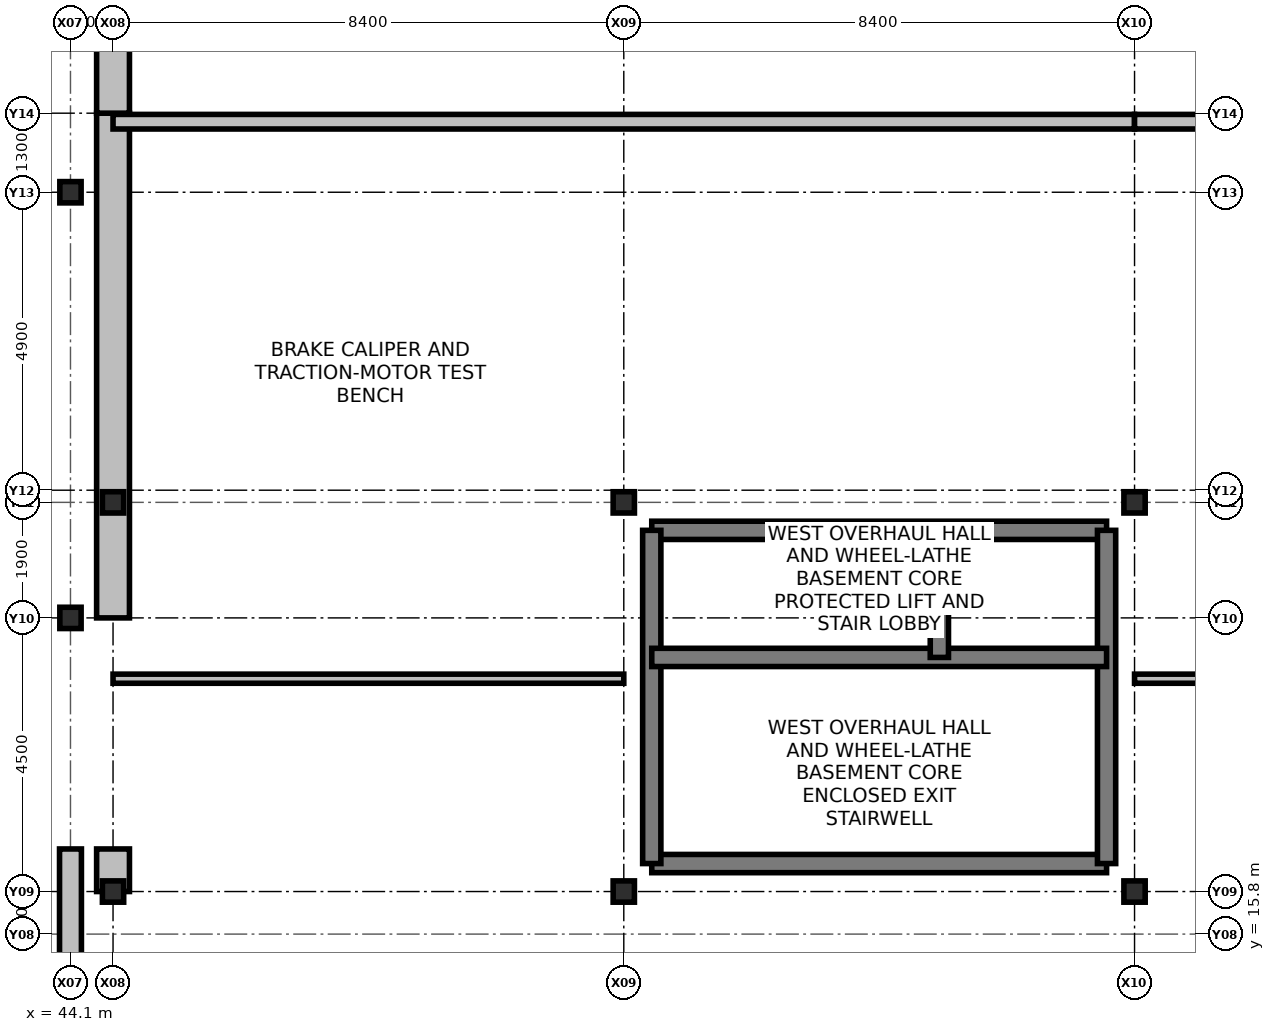
"""IFC4 building model, lengths in metres.
Left out: names, types, materials, properties, quantities, classifications, styles, units other than length and angle.
Written with IfcOpenShell. Run it as: python <this file> out.ifc"""

import sys

from ifc_helpers import new_model, si_unit, direction, frame, frame_2d, origin, origin_2d, place, context, subcontext, project, spatial, rectangle, i_section, extrude, element, fill, save


model = new_model("IFC4")
c1 = context("Model", 3, precision=1e-05, world=origin(), true_north=direction((0.0, 1.0)))
c2 = subcontext(c1, "Body", "Model", "MODEL_VIEW")
j1 = project(units=[si_unit("LENGTHUNIT", "METRE"), si_unit("PLANEANGLEUNIT", "RADIAN")], contexts=[c1])
p1 = place(None, origin())
s1 = spatial("IfcSite", under=j1, at=p1, CompositionType="ELEMENT")
p2 = place(p1, origin())
s2 = spatial("IfcBuilding", under=s1, at=p2, CompositionType="ELEMENT")
p3 = place(p2, frame((0.0, 0.0, 6.0)))
s3 = spatial("IfcBuildingStorey", under=s2, at=p3, CompositionType="ELEMENT", Elevation=6.0)
for number, where, z_axis, x_axis in (
    (1, (44.8, 16.5, 0.0), (0.0, 0.0, 1.0), (1.0, 0.0, 0.0)),
    (2, (44.8, 22.9, 0.0), (0.0, 0.0, 1.0), (1.0, 0.0, 0.0)),
    (3, (53.2, 16.5, 0.0), (0.0, 0.0, 1.0), (1.0, 0.0, 0.0)),
    (4, (53.2, 22.9, 0.0), (0.0, 0.0, 1.0), (1.0, 0.0, 0.0)),
    (5, (61.6, 16.5, 0.0), (0.0, 0.0, 1.0), (1.0, 0.0, 0.0)),
    (6, (61.6, 22.9, 0.0), (0.0, 0.0, 1.0), (1.0, 0.0, 0.0)),
    (7, (44.1, 21.0, 0.0), (0.0, 0.0, 1.0), (1.0, 0.0, 0.0)),
    (8, (44.1, 28.0, 0.0), (0.0, 0.0, 1.0), (1.0, 0.0, 0.0)),
):
    element("IfcColumn", number, at=place(p3, frame(where, z_axis=z_axis, x_axis=x_axis)), inside=s3, PredefinedType="COLUMN", context=c2, shape_type="SweptSolid", body=[
        extrude(i_section(OverallWidth=0.35, OverallDepth=0.35, WebThickness=0.012, FlangeThickness=0.019, at=origin_2d()), origin(), (0.0, 0.0, 1.0), 5.1),
    ])
p4 = place(p3, frame((44.8, 16.5, 0.0), z_axis=(0.0, 0.0, 1.0), x_axis=(0.0, 1.0, 0.0)))
e9 = element("IfcWall", 9, at=p4, inside=s3, PredefinedType="SOLIDWALL", context=c2, shape_type="SweptSolid", body=[
    extrude(rectangle(XDim=0.7, YDim=0.54, at=frame_2d((0.35, 0.0))), origin(), (0.0, 0.0, 1.0), 2.58),
])
p5 = place(p3, frame((44.8, 21.0, 0.0), z_axis=(0.0, 0.0, 1.0), x_axis=(0.0, 1.0, 0.0)))
e10 = element("IfcWall", 10, at=p5, inside=s3, PredefinedType="SOLIDWALL", context=c2, shape_type="SweptSolid", body=[
    extrude(rectangle(XDim=8.3, YDim=0.54, at=frame_2d((4.15, 0.0))), origin(), (0.0, 0.0, 1.0), 2.58),
])
p6 = place(p3, frame((44.8, 29.3, -0.02), z_axis=(0.0, 0.0, 1.0), x_axis=(0.0, 1.0, 0.0)))
e11 = element("IfcWall", 11, at=p6, inside=s3, PredefinedType="SOLIDWALL", context=c2, shape_type="SweptSolid", body=[
    extrude(rectangle(XDim=25.6, YDim=0.54, at=frame_2d((12.8, 0.0))), origin(), (0.0, 0.0, 1.0), 2.6),
])
p7 = place(p3, frame((44.8, 29.16, 9.3), z_axis=(0.0, 0.0, 1.0), x_axis=(1.0, 0.0, 0.0)))
e12 = element("IfcWall", 12, at=p7, inside=s3, PredefinedType="SOLIDWALL", context=c2, shape_type="SweptSolid", body=[
    extrude(rectangle(XDim=16.8, YDim=0.24, at=frame_2d((8.4, 0.0))), origin(), (0.0, 0.0, 1.0), 2.75),
])
p8 = place(p7, frame((2.64, 0.0, 0.45)))
e13 = element("IfcOpeningElement", 13, at=p8, cuts=e12, PredefinedType="OPENING", context=c2, shape_type="SweptSolid", body=[
    extrude(rectangle(XDim=3.0, YDim=1.4, at=frame_2d((1.5, 0.7))), frame((0.0, 0.13, 0.0), z_axis=(0.0, -1.0, 0.0), x_axis=(1.0, 0.0, 0.0)), (0.0, 0.0, 1.0), 0.26),
])
p9 = place(p7, frame((9.94, 0.0, 0.45)))
e14 = element("IfcOpeningElement", 14, at=p9, cuts=e12, PredefinedType="OPENING", context=c2, shape_type="SweptSolid", body=[
    extrude(rectangle(XDim=3.0, YDim=1.4, at=frame_2d((1.5, 0.7))), frame((0.0, 0.13, 0.0), z_axis=(0.0, -1.0, 0.0), x_axis=(1.0, 0.0, 0.0)), (0.0, 0.0, 1.0), 0.26),
])
p10 = place(p3, frame((61.6, 29.16, 9.3), z_axis=(0.0, 0.0, 1.0), x_axis=(1.0, 0.0, 0.0)))
e15 = element("IfcWall", 15, at=p10, inside=s3, PredefinedType="SOLIDWALL", context=c2, shape_type="SweptSolid", body=[
    extrude(rectangle(XDim=16.8, YDim=0.24, at=frame_2d((8.4, 0.0))), origin(), (0.0, 0.0, 1.0), 2.75),
])
p11 = place(p10, frame((2.64, 0.0, 0.45)))
e16 = element("IfcOpeningElement", 16, at=p11, cuts=e15, PredefinedType="OPENING", context=c2, shape_type="SweptSolid", body=[
    extrude(rectangle(XDim=4.2, YDim=1.5, at=frame_2d((2.1, 0.75))), frame((0.0, 0.13, 0.0), z_axis=(0.0, -1.0, 0.0), x_axis=(1.0, 0.0, 0.0)), (0.0, 0.0, 1.0), 0.26),
])
p12 = place(p10, frame((9.94, 0.0, 0.45)))
e17 = element("IfcOpeningElement", 17, at=p12, cuts=e15, PredefinedType="OPENING", context=c2, shape_type="SweptSolid", body=[
    extrude(rectangle(XDim=4.2, YDim=1.5, at=frame_2d((2.1, 0.75))), frame((0.0, 0.13, 0.0), z_axis=(0.0, -1.0, 0.0), x_axis=(1.0, 0.0, 0.0)), (0.0, 0.0, 1.0), 0.26),
])
p13 = place(p3, frame((44.1, 14.0, 0.0), z_axis=(0.0, 0.0, 1.0), x_axis=(0.0, 1.0, 0.0)))
e18 = element("IfcWall", 18, at=p13, inside=s3, PredefinedType="SOLIDWALL", context=c2, shape_type="SweptSolid", body=[
    extrude(rectangle(XDim=3.2, YDim=0.36, at=frame_2d((1.6, 0.0))), origin(), (0.0, 0.0, 1.0), 2.9),
])
p14 = place(p3, frame((53.66, 16.96, 0.0), z_axis=(0.0, 0.0, 1.0), x_axis=(1.0, 0.0, 0.0)))
e19 = element("IfcWall", 19, at=p14, inside=s3, PredefinedType="SHEAR", context=c2, shape_type="SweptSolid", body=[
    extrude(rectangle(XDim=7.48, YDim=0.3, at=frame_2d((3.74, 0.0))), origin(), (0.0, 0.0, 1.0), 4.82),
])
p15 = place(p3, frame((53.66, 22.44, 0.0), z_axis=(0.0, 0.0, 1.0), x_axis=(1.0, 0.0, 0.0)))
e20 = element("IfcWall", 20, at=p15, inside=s3, PredefinedType="SHEAR", context=c2, shape_type="SweptSolid", body=[
    extrude(rectangle(XDim=7.48, YDim=0.3, at=frame_2d((3.74, 0.0))), origin(), (0.0, 0.0, 1.0), 4.82),
])
p16 = place(p15, frame((0.55, 0.0, 0.0)))
e21 = element("IfcOpeningElement", 21, at=p16, cuts=e20, PredefinedType="OPENING", context=c2, shape_type="SweptSolid", body=[
    extrude(rectangle(XDim=1.5, YDim=2.2, at=frame_2d((0.75, 1.1))), frame((0.0, 0.16, 0.0), z_axis=(0.0, -1.0, 0.0), x_axis=(1.0, 0.0, 0.0)), (0.0, 0.0, 1.0), 0.32),
])
for number, where, z_axis, x_axis in (
    (22, (53.66, 16.96, 0.0), (0.0, 0.0, 1.0), (0.0, 1.0, 0.0)),
    (23, (61.14, 16.96, 0.0), (0.0, 0.0, 1.0), (0.0, 1.0, 0.0)),
):
    element("IfcWall", number, at=place(p3, frame(where, z_axis=z_axis, x_axis=x_axis)), inside=s3, PredefinedType="SHEAR", context=c2, shape_type="SweptSolid", body=[
        extrude(rectangle(XDim=5.48, YDim=0.3, at=frame_2d((2.74, 0.0))), origin(), (0.0, 0.0, 1.0), 4.82),
    ])
p17 = place(p3, frame((53.66, 20.35, 0.0), z_axis=(0.0, 0.0, 1.0), x_axis=(1.0, 0.0, 0.0)))
e24 = element("IfcWall", 24, at=p17, inside=s3, PredefinedType="SHEAR", context=c2, shape_type="SweptSolid", body=[
    extrude(rectangle(XDim=7.48, YDim=0.3, at=frame_2d((3.74, 0.0))), origin(), (0.0, 0.0, 1.0), 4.82),
])
p18 = place(p17, frame((0.185, 0.0, 0.0)))
e25 = element("IfcOpeningElement", 25, at=p18, cuts=e24, PredefinedType="OPENING", context=c2, shape_type="SweptSolid", body=[
    extrude(rectangle(XDim=1.05, YDim=2.15, at=frame_2d((0.525, 1.075))), frame((0.0, 0.16, 0.0), z_axis=(0.0, -1.0, 0.0), x_axis=(1.0, 0.0, 0.0)), (0.0, 0.0, 1.0), 0.32),
])
p19 = place(p3, frame((58.39, 20.35, 0.0), z_axis=(0.0, 0.0, 1.0), x_axis=(0.0, 1.0, 0.0)))
e26 = element("IfcWall", 26, at=p19, inside=s3, PredefinedType="SHEAR", context=c2, shape_type="SweptSolid", body=[
    extrude(rectangle(XDim=2.09, YDim=0.3, at=frame_2d((1.045, 0.0))), origin(), (0.0, 0.0, 1.0), 4.82),
])
p20 = place(p19, frame((0.27, 0.0, 0.0)))
e27 = element("IfcOpeningElement", 27, at=p20, cuts=e26, PredefinedType="OPENING", context=c2, shape_type="SweptSolid", body=[
    extrude(rectangle(XDim=1.55, YDim=2.35, at=frame_2d((0.775, 1.175))), frame((0.0, 0.16, 0.0), z_axis=(0.0, -1.0, 0.0), x_axis=(1.0, 0.0, 0.0)), (0.0, 0.0, 1.0), 0.32),
])
p21 = place(p3, frame((44.8, 20.0, 0.0), z_axis=(0.0, 0.0, 1.0), x_axis=(1.0, 0.0, 0.0)))
e28 = element("IfcWall", 28, at=p21, inside=s3, PredefinedType="PARTITIONING", context=c2, shape_type="SweptSolid", body=[
    extrude(rectangle(XDim=8.4, YDim=0.15, at=frame_2d((4.2, 0.0))), origin(), (0.0, 0.0, 1.0), 4.05),
])
p22 = place(p21, frame((3.2, 0.0, 0.0)))
e29 = element("IfcOpeningElement", 29, at=p22, cuts=e28, PredefinedType="OPENING", context=c2, shape_type="SweptSolid", body=[
    extrude(rectangle(XDim=1.1, YDim=2.1, at=frame_2d((0.55, 1.05))), frame((0.0, 0.085, 0.0), z_axis=(0.0, -1.0, 0.0), x_axis=(1.0, 0.0, 0.0)), (0.0, 0.0, 1.0), 0.17),
])
p23 = place(p3, frame((61.6, 20.0, 0.0), z_axis=(0.0, 0.0, 1.0), x_axis=(1.0, 0.0, 0.0)))
e30 = element("IfcWall", 30, at=p23, inside=s3, PredefinedType="PARTITIONING", context=c2, shape_type="SweptSolid", body=[
    extrude(rectangle(XDim=67.2, YDim=0.15, at=frame_2d((33.6, 0.0))), origin(), (0.0, 0.0, 1.0), 4.05),
])
p24 = place(p23, frame((12.0, 0.0, 0.0)))
e31 = element("IfcOpeningElement", 31, at=p24, cuts=e30, PredefinedType="OPENING", context=c2, shape_type="SweptSolid", body=[
    extrude(rectangle(XDim=1.25, YDim=2.15, at=frame_2d((0.625, 1.075))), frame((0.0, 0.085, 0.0), z_axis=(0.0, -1.0, 0.0), x_axis=(1.0, 0.0, 0.0)), (0.0, 0.0, 1.0), 0.17),
])
p25 = place(p23, frame((34.0, 0.0, 0.0)))
e32 = element("IfcOpeningElement", 32, at=p25, cuts=e30, PredefinedType="OPENING", context=c2, shape_type="SweptSolid", body=[
    extrude(rectangle(XDim=1.35, YDim=2.2, at=frame_2d((0.675, 1.1))), frame((0.0, 0.085, 0.0), z_axis=(0.0, -1.0, 0.0), x_axis=(1.0, 0.0, 0.0)), (0.0, 0.0, 1.0), 0.17),
])
p26 = place(p23, frame((56.0, 0.0, 0.0)))
e33 = element("IfcOpeningElement", 33, at=p26, cuts=e30, PredefinedType="OPENING", context=c2, shape_type="SweptSolid", body=[
    extrude(rectangle(XDim=1.1, YDim=2.1, at=frame_2d((0.55, 1.05))), frame((0.0, 0.085, 0.0), z_axis=(0.0, -1.0, 0.0), x_axis=(1.0, 0.0, 0.0)), (0.0, 0.0, 1.0), 0.17),
])
p27 = place(p8, origin())
e34 = element("IfcWindow", 34, at=p27, inside=s3, PartitioningType="SINGLE_PANEL", PredefinedType="SKYLIGHT", context=c2, shape_type="SweptSolid", body=[
    extrude(rectangle(XDim=3.0, YDim=1.4, at=frame_2d((1.5, 0.7))), frame((0.0, 0.03, 0.0), z_axis=(0.0, -1.0, 0.0), x_axis=(1.0, 0.0, 0.0)), (0.0, 0.0, 1.0), 0.06),
])
fill(e13, e34)
p28 = place(p9, origin())
e35 = element("IfcWindow", 35, at=p28, inside=s3, PartitioningType="SINGLE_PANEL", PredefinedType="SKYLIGHT", context=c2, shape_type="SweptSolid", body=[
    extrude(rectangle(XDim=3.0, YDim=1.4, at=frame_2d((1.5, 0.7))), frame((0.0, 0.03, 0.0), z_axis=(0.0, -1.0, 0.0), x_axis=(1.0, 0.0, 0.0)), (0.0, 0.0, 1.0), 0.06),
])
fill(e14, e35)
p29 = place(p18, origin())
e36 = element("IfcDoor", 36, at=p29, inside=s3, OperationType="SINGLE_SWING_LEFT", PredefinedType="DOOR", context=c2, shape_type="SweptSolid", body=[
    extrude(rectangle(XDim=1.05, YDim=2.15, at=frame_2d((0.525, 1.075))), frame((0.0, 0.025, 0.0), z_axis=(0.0, -1.0, 0.0), x_axis=(1.0, 0.0, 0.0)), (0.0, 0.0, 1.0), 0.05),
])
fill(e25, e36)
p30 = place(p16, origin())
e37 = element("IfcDoor", 37, at=p30, inside=s3, OperationType="DOUBLE_DOOR_SINGLE_SWING", PredefinedType="DOOR", context=c2, shape_type="SweptSolid", body=[
    extrude(rectangle(XDim=1.5, YDim=2.2, at=frame_2d((0.75, 1.1))), frame((0.0, 0.025, 0.0), z_axis=(0.0, -1.0, 0.0), x_axis=(1.0, 0.0, 0.0)), (0.0, 0.0, 1.0), 0.05),
])
fill(e21, e37)
p31 = place(p20, origin())
e38 = element("IfcDoor", 38, at=p31, inside=s3, OperationType="SLIDING_TO_RIGHT", PredefinedType="DOOR", context=c2, shape_type="SweptSolid", body=[
    extrude(rectangle(XDim=1.55, YDim=2.35, at=frame_2d((0.775, 1.175))), frame((0.0, 0.025, 0.0), z_axis=(0.0, -1.0, 0.0), x_axis=(1.0, 0.0, 0.0)), (0.0, 0.0, 1.0), 0.05),
])
fill(e27, e38)
p32 = place(p22, origin())
e39 = element("IfcDoor", 39, at=p32, inside=s3, OperationType="SINGLE_SWING_LEFT", PredefinedType="DOOR", context=c2, shape_type="SweptSolid", body=[
    extrude(rectangle(XDim=1.1, YDim=2.1, at=frame_2d((0.55, 1.05))), frame((0.0, 0.025, 0.0), z_axis=(0.0, -1.0, 0.0), x_axis=(1.0, 0.0, 0.0)), (0.0, 0.0, 1.0), 0.05),
])
fill(e29, e39)
save(model, sys.argv[1])
